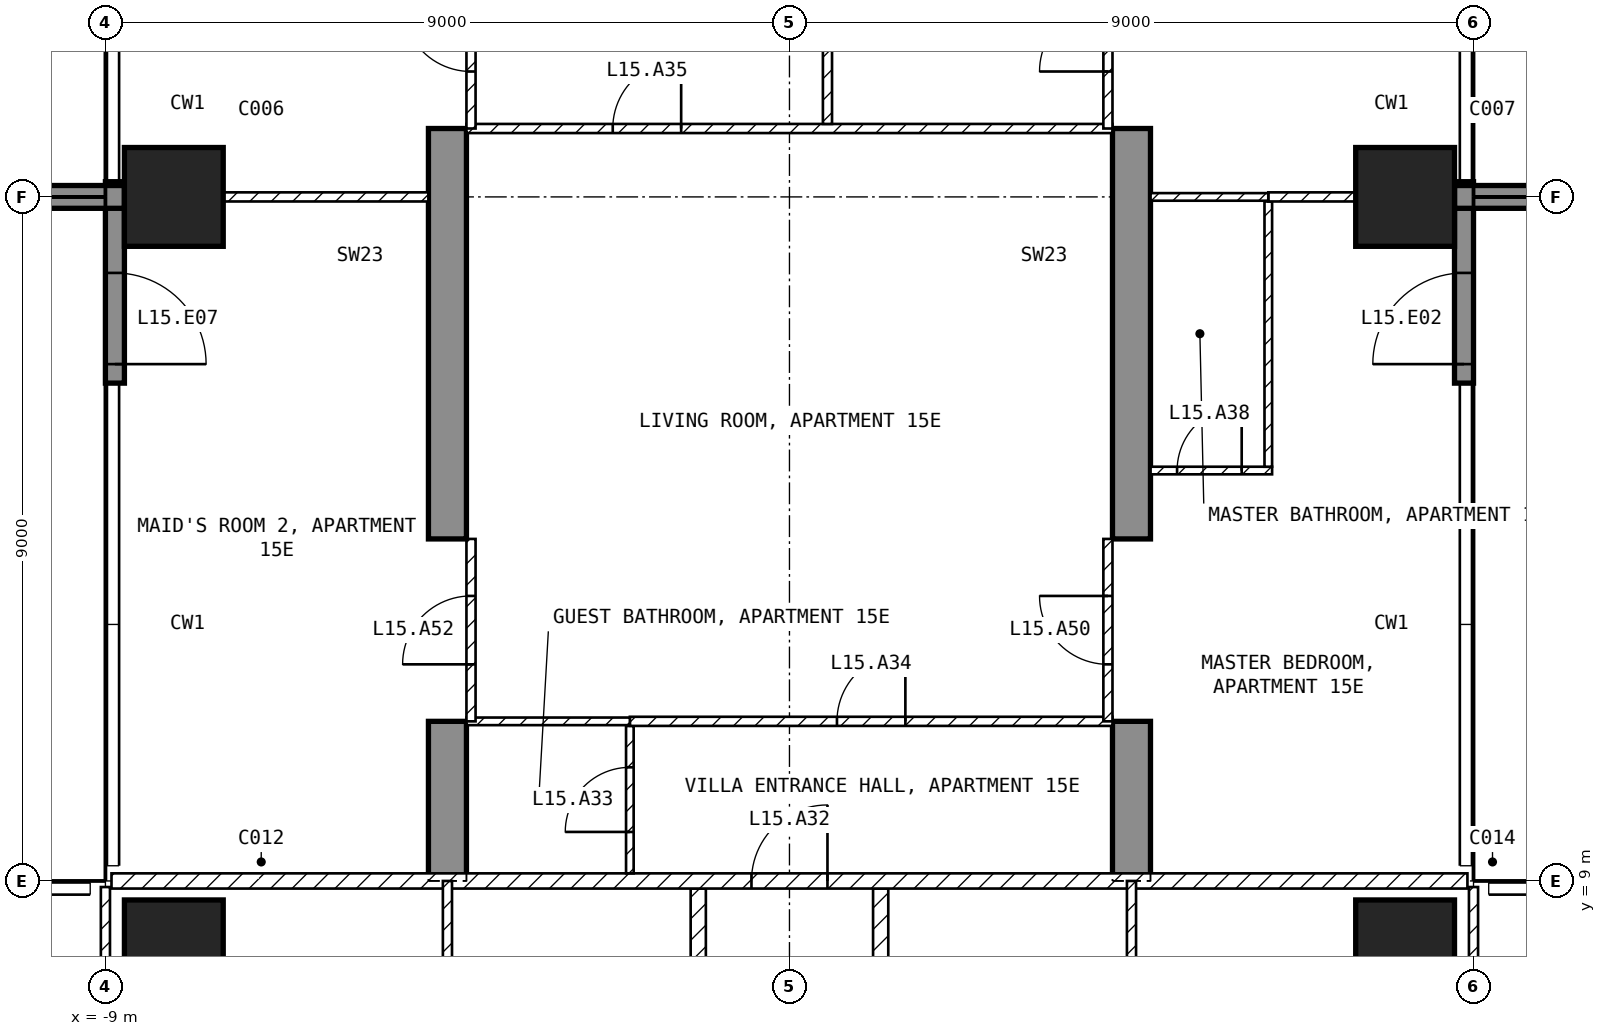
"""IFC4 building model, lengths in metres.
Left out: names, types, materials, properties, quantities, classifications, styles, units other than length and angle.
Written with IfcOpenShell. Run it as: python <this file> out.ifc"""

import sys

from ifc_helpers import new_model, si_unit, direction, frame, frame_2d, origin, origin_2d, place, context, subcontext, project, spatial, polyline, rectangle, outline, extrude, element, fill, save


model = new_model("IFC4")
c1 = context("Model", 3, precision=1e-05, world=origin(), true_north=direction((0.0, 1.0)))
c2 = subcontext(c1, "Body", "Model", "MODEL_VIEW")
j1 = project(units=[si_unit("LENGTHUNIT", "METRE"), si_unit("PLANEANGLEUNIT", "RADIAN")], contexts=[c1])
p1 = place(None, origin())
s1 = spatial("IfcSite", under=j1, at=p1, CompositionType="ELEMENT")
p2 = place(p1, origin())
s2 = spatial("IfcBuilding", under=s1, at=p2, CompositionType="ELEMENT")
p3 = place(p2, frame((0.0, 0.0, 71.5)))
s3 = spatial("IfcBuildingStorey", under=s2, at=p3, CompositionType="ELEMENT", Elevation=71.5)
for number, where, z_axis, x_axis in (
    (1, (-8.1, 8.1, -0.25), (0.0, 0.0, 1.0), (1.0, 0.0, 0.0)),
    (2, (-8.1, 18.0, -0.25), (0.0, 0.0, 1.0), (1.0, 0.0, 0.0)),
    (3, (8.1, 8.1, -0.25), (0.0, 0.0, 1.0), (1.0, 0.0, 0.0)),
    (4, (8.1, 18.0, -0.25), (0.0, 0.0, 1.0), (1.0, 0.0, 0.0)),
):
    element("IfcColumn", number, at=place(p3, frame(where, z_axis=z_axis, x_axis=x_axis)), inside=s3, PredefinedType="COLUMN", context=c2, shape_type="SweptSolid", body=[
        extrude(rectangle(XDim=1.3, YDim=1.3, at=origin_2d()), origin(), (0.0, 0.0, 1.0), 3.5),
    ])
for number, where, z_axis, x_axis in (
    (5, (-4.75, 9.0, -0.25), (1.0, 0.0, 0.0), (0.0, 1.0, 0.0)),
    (6, (4.25, 9.0, -0.25), (1.0, 0.0, 0.0), (0.0, 1.0, 0.0)),
):
    element("IfcWall", number, at=place(p3, frame(where, z_axis=z_axis, x_axis=x_axis)), inside=s3, PredefinedType="SHEAR", context=c2, shape_type="SweptSolid", body=[
        extrude(outline(polyline([(0.0, 0.0), (2.1, 0.0), (2.1, 2.65), (4.5, 2.65), (4.5, 0.0), (9.9, 0.0), (9.9, 2.65), (12.3, 2.65), (12.3, 0.0), (16.45, 0.0), (16.45, 3.5), (0.0, 3.5), (0.0, 0.0)])), origin(), (0.0, 0.0, 1.0), 0.5),
    ])
p4 = place(p3, frame((8.875, 15.55, 0.0), z_axis=(0.0, 0.0, 1.0), x_axis=(0.0, 1.0, 0.0)))
e7 = element("IfcWall", 7, at=p4, inside=s3, PredefinedType="SOLIDWALL", context=c2, shape_type="SweptSolid", body=[
    extrude(rectangle(XDim=2.65, YDim=0.25, at=frame_2d((1.325, 0.0))), origin(), (0.0, 0.0, 1.0), 3.25),
])
p5 = place(p4, frame((0.25, 0.0, 0.0)))
e8 = element("IfcOpeningElement", 8, at=p5, cuts=e7, PredefinedType="OPENING", context=c2, shape_type="SweptSolid", body=[
    extrude(rectangle(XDim=1.2, YDim=2.4, at=frame_2d((0.6, 1.2))), frame((0.0, 0.135, 0.0), z_axis=(0.0, -1.0, 0.0), x_axis=(1.0, 0.0, 0.0)), (0.0, 0.0, 1.0), 0.27),
])
p6 = place(p3, frame((-8.875, 18.2, 0.0), z_axis=(0.0, 0.0, 1.0), x_axis=(0.0, -1.0, 0.0)))
e9 = element("IfcWall", 9, at=p6, inside=s3, PredefinedType="SOLIDWALL", context=c2, shape_type="SweptSolid", body=[
    extrude(rectangle(XDim=2.65, YDim=0.25, at=frame_2d((1.325, 0.0))), origin(), (0.0, 0.0, 1.0), 3.25),
])
p7 = place(p6, frame((1.2, 0.0, 0.0)))
e10 = element("IfcOpeningElement", 10, at=p7, cuts=e9, PredefinedType="OPENING", context=c2, shape_type="SweptSolid", body=[
    extrude(rectangle(XDim=1.2, YDim=2.4, at=frame_2d((0.6, 1.2))), frame((0.0, 0.135, 0.0), z_axis=(0.0, -1.0, 0.0), x_axis=(1.0, 0.0, 0.0)), (0.0, 0.0, 1.0), 0.27),
])
for number, where, z_axis, x_axis in (
    (11, (-8.75, 18.0, 0.0), (0.0, 0.0, 1.0), (-1.0, 0.0, 0.0)),
    (12, (8.75, 18.0, 0.0), (0.0, 0.0, 1.0), (1.0, 0.0, 0.0)),
):
    element("IfcWall", number, at=place(p3, frame(where, z_axis=z_axis, x_axis=x_axis)), inside=s3, PredefinedType="SOLIDWALL", context=c2, shape_type="SweptSolid", body=[
        extrude(rectangle(XDim=2.95, YDim=0.3, at=frame_2d((1.475, 0.0))), origin(), (0.0, 0.0, 1.0), 3.25),
    ])
for number, where, z_axis, x_axis in (
    (13, (1.2, 8.9, 0.0), (0.0, 0.0, 1.0), (0.0, -1.0, 0.0)),
    (14, (-1.2, 1.3, 0.0), (0.0, 0.0, 1.0), (0.0, 1.0, 0.0)),
):
    element("IfcWall", number, at=place(p3, frame(where, z_axis=z_axis, x_axis=x_axis)), inside=s3, PredefinedType="PARTITIONING", context=c2, shape_type="SweptSolid", body=[
        extrude(rectangle(XDim=7.6, YDim=0.2, at=frame_2d((3.8, 0.0))), origin(), (0.0, 0.0, 1.0), 3.25),
    ])
p8 = place(p3, frame((-8.92, 9.0, 0.0), z_axis=(0.0, 0.0, 1.0), x_axis=(1.0, 0.0, 0.0)))
e15 = element("IfcWall", 15, at=p8, inside=s3, PredefinedType="PARTITIONING", context=c2, shape_type="SweptSolid", body=[
    extrude(rectangle(XDim=17.84, YDim=0.2, at=frame_2d((8.92, 0.0))), origin(), (0.0, 0.0, 1.0), 3.25),
])
p9 = place(p8, frame((8.42, 0.0, 0.0)))
e16 = element("IfcOpeningElement", 16, at=p9, cuts=e15, PredefinedType="OPENING", context=c2, shape_type="SweptSolid", body=[
    extrude(rectangle(XDim=1.0, YDim=2.1, at=frame_2d((0.5, 1.05))), frame((0.0, 0.11, 0.0), z_axis=(0.0, -1.0, 0.0), x_axis=(1.0, 0.0, 0.0)), (0.0, 0.0, 1.0), 0.22),
])
p10 = place(p3, frame((9.0, 3.6, 0.0), z_axis=(0.0, 0.0, 1.0), x_axis=(0.0, 1.0, 0.0)))
e17 = element("IfcWall", 17, at=p10, inside=s3, PredefinedType="PARTITIONING", context=c2, shape_type="SweptSolid", body=[
    extrude(rectangle(XDim=5.32, YDim=0.12, at=frame_2d((2.66, 0.0))), origin(), (0.0, 0.0, 1.0), 3.25),
])
p11 = place(p10, frame((1.75, 0.0, 0.0)))
e18 = element("IfcOpeningElement", 18, at=p11, cuts=e17, PredefinedType="OPENING", context=c2, shape_type="SweptSolid", body=[
    extrude(rectangle(XDim=0.9, YDim=2.1, at=frame_2d((0.45, 1.05))), frame((0.0, 0.07, 0.0), z_axis=(0.0, -1.0, 0.0), x_axis=(1.0, 0.0, 0.0)), (0.0, 0.0, 1.0), 0.14),
])
p12 = place(p3, frame((4.5, 4.32, 0.0), z_axis=(0.0, 0.0, 1.0), x_axis=(0.0, 1.0, 0.0)))
e19 = element("IfcWall", 19, at=p12, inside=s3, PredefinedType="PARTITIONING", context=c2, shape_type="SweptSolid", body=[
    extrude(rectangle(XDim=4.68, YDim=0.12, at=frame_2d((2.34, 0.0))), origin(), (0.0, 0.0, 1.0), 3.25),
])
p13 = place(p12, frame((1.89, 0.0, 0.0)))
e20 = element("IfcOpeningElement", 20, at=p13, cuts=e19, PredefinedType="OPENING", context=c2, shape_type="SweptSolid", body=[
    extrude(rectangle(XDim=0.9, YDim=2.1, at=frame_2d((0.45, 1.05))), frame((0.0, 0.07, 0.0), z_axis=(0.0, -1.0, 0.0), x_axis=(1.0, 0.0, 0.0)), (0.0, 0.0, 1.0), 0.14),
])
p14 = place(p3, frame((-9.0, 8.92, 0.0), z_axis=(0.0, 0.0, 1.0), x_axis=(0.0, -1.0, 0.0)))
e21 = element("IfcWall", 21, at=p14, inside=s3, PredefinedType="PARTITIONING", context=c2, shape_type="SweptSolid", body=[
    extrude(rectangle(XDim=4.36, YDim=0.12, at=frame_2d((2.18, 0.0))), origin(), (0.0, 0.0, 1.0), 3.25),
])
p15 = place(p14, frame((2.69, 0.0, 0.0)))
e22 = element("IfcOpeningElement", 22, at=p15, cuts=e21, PredefinedType="OPENING", context=c2, shape_type="SweptSolid", body=[
    extrude(rectangle(XDim=0.9, YDim=2.1, at=frame_2d((0.45, 1.05))), frame((0.0, 0.07, 0.0), z_axis=(0.0, -1.0, 0.0), x_axis=(1.0, 0.0, 0.0)), (0.0, 0.0, 1.0), 0.14),
])
p16 = place(p3, frame((-4.5, 9.0, 0.0), z_axis=(0.0, 0.0, 1.0), x_axis=(0.0, -1.0, 0.0)))
e23 = element("IfcWall", 23, at=p16, inside=s3, PredefinedType="PARTITIONING", context=c2, shape_type="SweptSolid", body=[
    extrude(rectangle(XDim=7.7, YDim=0.12, at=frame_2d((3.85, 0.0))), origin(), (0.0, 0.0, 1.0), 3.25),
])
p17 = place(p16, frame((1.812, 0.0, 0.0)))
e24 = element("IfcOpeningElement", 24, at=p17, cuts=e23, PredefinedType="OPENING", context=c2, shape_type="SweptSolid", body=[
    extrude(rectangle(XDim=0.9, YDim=2.1, at=frame_2d((0.45, 1.05))), frame((0.0, 0.07, 0.0), z_axis=(0.0, -1.0, 0.0), x_axis=(1.0, 0.0, 0.0)), (0.0, 0.0, 1.0), 0.14),
])
p18 = place(p3, frame((-2.1, 9.1, 0.0), z_axis=(0.0, 0.0, 1.0), x_axis=(0.0, 1.0, 0.0)))
e25 = element("IfcWall", 25, at=p18, inside=s3, PredefinedType="PARTITIONING", context=c2, shape_type="SweptSolid", body=[
    extrude(rectangle(XDim=1.94, YDim=0.1, at=frame_2d((0.97, 0.0))), origin(), (0.0, 0.0, 1.0), 3.25),
])
p19 = place(p18, frame((0.545, 0.0, 0.0)))
e26 = element("IfcOpeningElement", 26, at=p19, cuts=e25, PredefinedType="OPENING", context=c2, shape_type="SweptSolid", body=[
    extrude(rectangle(XDim=0.85, YDim=2.1, at=frame_2d((0.425, 1.05))), frame((0.0, 0.06, 0.0), z_axis=(0.0, -1.0, 0.0), x_axis=(1.0, 0.0, 0.0)), (0.0, 0.0, 1.0), 0.12),
])
p20 = place(p3, frame((-2.1, 11.1, 0.0), z_axis=(0.0, 0.0, 1.0), x_axis=(1.0, 0.0, 0.0)))
e27 = element("IfcWall", 27, at=p20, inside=s3, PredefinedType="PARTITIONING", context=c2, shape_type="SweptSolid", body=[
    extrude(rectangle(XDim=6.35, YDim=0.12, at=frame_2d((3.175, 0.0))), origin(), (0.0, 0.0, 1.0), 3.25),
])
p21 = place(p20, frame((2.725, 0.0, 0.0)))
e28 = element("IfcOpeningElement", 28, at=p21, cuts=e27, PredefinedType="OPENING", context=c2, shape_type="SweptSolid", body=[
    extrude(rectangle(XDim=0.9, YDim=2.1, at=frame_2d((0.45, 1.05))), frame((0.0, 0.07, 0.0), z_axis=(0.0, -1.0, 0.0), x_axis=(1.0, 0.0, 0.0)), (0.0, 0.0, 1.0), 0.14),
])
p22 = place(p3, frame((-4.25, 11.1, 0.0), z_axis=(0.0, 0.0, 1.0), x_axis=(1.0, 0.0, 0.0)))
e29 = element("IfcWall", 29, at=p22, inside=s3, PredefinedType="PARTITIONING", context=c2, shape_type="SweptSolid", body=[
    extrude(rectangle(XDim=2.15, YDim=0.1, at=frame_2d((1.075, 0.0))), origin(), (0.0, 0.0, 1.0), 3.25),
])
p23 = place(p3, frame((-4.25, 18.9, 0.0), z_axis=(0.0, 0.0, 1.0), x_axis=(1.0, 0.0, 0.0)))
e30 = element("IfcWall", 30, at=p23, inside=s3, PredefinedType="PARTITIONING", context=c2, shape_type="SweptSolid", body=[
    extrude(rectangle(XDim=8.5, YDim=0.12, at=frame_2d((4.25, 0.0))), origin(), (0.0, 0.0, 1.0), 3.25),
])
p24 = place(p23, frame((1.925, 0.0, 0.0)))
e31 = element("IfcOpeningElement", 31, at=p24, cuts=e30, PredefinedType="OPENING", context=c2, shape_type="SweptSolid", body=[
    extrude(rectangle(XDim=0.9, YDim=2.1, at=frame_2d((0.45, 1.05))), frame((0.0, 0.07, 0.0), z_axis=(0.0, -1.0, 0.0), x_axis=(1.0, 0.0, 0.0)), (0.0, 0.0, 1.0), 0.14),
])
p25 = place(p3, frame((0.5, 23.34, 0.0), z_axis=(0.0, 0.0, 1.0), x_axis=(0.0, -1.0, 0.0)))
e32 = element("IfcWall", 32, at=p25, inside=s3, PredefinedType="PARTITIONING", context=c2, shape_type="SweptSolid", body=[
    extrude(rectangle(XDim=4.38, YDim=0.12, at=frame_2d((2.19, 0.0))), origin(), (0.0, 0.0, 1.0), 3.25),
])
p26 = place(p25, frame((1.74, 0.0, 0.0)))
e33 = element("IfcOpeningElement", 33, at=p26, cuts=e32, PredefinedType="OPENING", context=c2, shape_type="SweptSolid", body=[
    extrude(rectangle(XDim=0.9, YDim=2.1, at=frame_2d((0.45, 1.05))), frame((0.0, 0.07, 0.0), z_axis=(0.0, -1.0, 0.0), x_axis=(1.0, 0.0, 0.0)), (0.0, 0.0, 1.0), 0.14),
])
p27 = place(p3, frame((4.75, 14.4, 0.0), z_axis=(0.0, 0.0, 1.0), x_axis=(1.0, 0.0, 0.0)))
e34 = element("IfcWall", 34, at=p27, inside=s3, PredefinedType="PARTITIONING", context=c2, shape_type="SweptSolid", body=[
    extrude(rectangle(XDim=1.6, YDim=0.1, at=frame_2d((0.8, 0.0))), origin(), (0.0, 0.0, 1.0), 3.25),
])
p28 = place(p27, frame((0.35, 0.0, 0.0)))
e35 = element("IfcOpeningElement", 35, at=p28, cuts=e34, PredefinedType="OPENING", context=c2, shape_type="SweptSolid", body=[
    extrude(rectangle(XDim=0.85, YDim=2.1, at=frame_2d((0.425, 1.05))), frame((0.0, 0.06, 0.0), z_axis=(0.0, -1.0, 0.0), x_axis=(1.0, 0.0, 0.0)), (0.0, 0.0, 1.0), 0.12),
])
p29 = place(p3, frame((6.3, 14.45, 0.0), z_axis=(0.0, 0.0, 1.0), x_axis=(0.0, 1.0, 0.0)))
e36 = element("IfcWall", 36, at=p29, inside=s3, PredefinedType="PARTITIONING", context=c2, shape_type="SweptSolid", body=[
    extrude(rectangle(XDim=3.49, YDim=0.1, at=frame_2d((1.745, 0.0))), origin(), (0.0, 0.0, 1.0), 3.25),
])
p30 = place(p3, frame((6.3, 18.0, 0.0), z_axis=(0.0, 0.0, 1.0), x_axis=(1.0, 0.0, 0.0)))
e37 = element("IfcWall", 37, at=p30, inside=s3, PredefinedType="PARTITIONING", context=c2, shape_type="SweptSolid", body=[
    extrude(rectangle(XDim=1.15, YDim=0.12, at=frame_2d((0.575, 0.0))), origin(), (0.0, 0.0, 1.0), 2.346),
])
p31 = place(p3, frame((4.75, 18.0, 0.0), z_axis=(0.0, 0.0, 1.0), x_axis=(1.0, 0.0, 0.0)))
e38 = element("IfcWall", 38, at=p31, inside=s3, PredefinedType="PARTITIONING", context=c2, shape_type="SweptSolid", body=[
    extrude(rectangle(XDim=1.55, YDim=0.1, at=frame_2d((0.775, 0.0))), origin(), (0.0, 0.0, 1.0), 2.346),
])
p32 = place(p3, frame((-7.45, 18.0, 0.0), z_axis=(0.0, 0.0, 1.0), x_axis=(1.0, 0.0, 0.0)))
e39 = element("IfcWall", 39, at=p32, inside=s3, PredefinedType="PARTITIONING", context=c2, shape_type="SweptSolid", body=[
    extrude(rectangle(XDim=2.7, YDim=0.12, at=frame_2d((1.35, 0.0))), origin(), (0.0, 0.0, 1.0), 2.346),
])
p33 = place(p3, frame((4.19, 11.1, 0.0), z_axis=(0.0, 0.0, 1.0), x_axis=(0.0, 1.0, 0.0)))
e40 = element("IfcWall", 40, at=p33, inside=s3, PredefinedType="PARTITIONING", context=c2, shape_type="SweptSolid", body=[
    extrude(rectangle(XDim=2.4, YDim=0.12, at=frame_2d((1.2, 0.0))), origin(), (0.0, 0.0, 1.0), 2.4),
])
p34 = place(p33, frame((0.75, 0.0, 0.0)))
e41 = element("IfcOpeningElement", 41, at=p34, cuts=e40, PredefinedType="OPENING", context=c2, shape_type="SweptSolid", body=[
    extrude(rectangle(XDim=0.9, YDim=2.1, at=frame_2d((0.45, 1.05))), frame((0.0, 0.07, 0.0), z_axis=(0.0, -1.0, 0.0), x_axis=(1.0, 0.0, 0.0)), (0.0, 0.0, 1.0), 0.14),
])
p35 = place(p3, frame((4.19, 18.9, 0.0), z_axis=(0.0, 0.0, 1.0), x_axis=(0.0, 1.0, 0.0)))
e42 = element("IfcWall", 42, at=p35, inside=s3, PredefinedType="PARTITIONING", context=c2, shape_type="SweptSolid", body=[
    extrude(rectangle(XDim=2.4, YDim=0.12, at=frame_2d((1.2, 0.0))), origin(), (0.0, 0.0, 1.0), 2.4),
])
p36 = place(p35, frame((0.75, 0.0, 0.0)))
e43 = element("IfcOpeningElement", 43, at=p36, cuts=e42, PredefinedType="OPENING", context=c2, shape_type="SweptSolid", body=[
    extrude(rectangle(XDim=0.9, YDim=2.1, at=frame_2d((0.45, 1.05))), frame((0.0, 0.07, 0.0), z_axis=(0.0, -1.0, 0.0), x_axis=(1.0, 0.0, 0.0)), (0.0, 0.0, 1.0), 0.14),
])
p37 = place(p3, frame((-4.19, 11.1, 0.0), z_axis=(0.0, 0.0, 1.0), x_axis=(0.0, 1.0, 0.0)))
e44 = element("IfcWall", 44, at=p37, inside=s3, PredefinedType="PARTITIONING", context=c2, shape_type="SweptSolid", body=[
    extrude(rectangle(XDim=2.4, YDim=0.12, at=frame_2d((1.2, 0.0))), origin(), (0.0, 0.0, 1.0), 2.4),
])
p38 = place(p37, frame((0.75, 0.0, 0.0)))
e45 = element("IfcOpeningElement", 45, at=p38, cuts=e44, PredefinedType="OPENING", context=c2, shape_type="SweptSolid", body=[
    extrude(rectangle(XDim=0.9, YDim=2.1, at=frame_2d((0.45, 1.05))), frame((0.0, 0.07, 0.0), z_axis=(0.0, -1.0, 0.0), x_axis=(1.0, 0.0, 0.0)), (0.0, 0.0, 1.0), 0.14),
])
p39 = place(p3, frame((-4.19, 18.9, 0.0), z_axis=(0.0, 0.0, 1.0), x_axis=(0.0, 1.0, 0.0)))
e46 = element("IfcWall", 46, at=p39, inside=s3, PredefinedType="PARTITIONING", context=c2, shape_type="SweptSolid", body=[
    extrude(rectangle(XDim=2.4, YDim=0.12, at=frame_2d((1.2, 0.0))), origin(), (0.0, 0.0, 1.0), 2.4),
])
p40 = place(p39, frame((0.75, 0.0, 0.0)))
e47 = element("IfcOpeningElement", 47, at=p40, cuts=e46, PredefinedType="OPENING", context=c2, shape_type="SweptSolid", body=[
    extrude(rectangle(XDim=0.9, YDim=2.1, at=frame_2d((0.45, 1.05))), frame((0.0, 0.07, 0.0), z_axis=(0.0, -1.0, 0.0), x_axis=(1.0, 0.0, 0.0)), (0.0, 0.0, 1.0), 0.14),
])
p41 = place(p5, origin())
e48 = element("IfcDoor", 48, at=p41, inside=s3, OperationType="SINGLE_SWING_LEFT", PredefinedType="DOOR", context=c2, shape_type="SweptSolid", body=[
    extrude(rectangle(XDim=1.2, YDim=2.4, at=frame_2d((0.6, 1.2))), frame((0.0, 0.025, 0.0), z_axis=(0.0, -1.0, 0.0), x_axis=(1.0, 0.0, 0.0)), (0.0, 0.0, 1.0), 0.05),
])
fill(e8, e48)
p42 = place(p7, origin())
e49 = element("IfcDoor", 49, at=p42, inside=s3, OperationType="SINGLE_SWING_RIGHT", PredefinedType="DOOR", context=c2, shape_type="SweptSolid", body=[
    extrude(rectangle(XDim=1.2, YDim=2.4, at=frame_2d((0.6, 1.2))), frame((0.0, 0.025, 0.0), z_axis=(0.0, -1.0, 0.0), x_axis=(1.0, 0.0, 0.0)), (0.0, 0.0, 1.0), 0.05),
])
fill(e10, e49)
p43 = place(p9, origin())
e50 = element("IfcDoor", 50, at=p43, inside=s3, OperationType="SINGLE_SWING_RIGHT", PredefinedType="DOOR", context=c2, shape_type="SweptSolid", body=[
    extrude(rectangle(XDim=1.0, YDim=2.1, at=frame_2d((0.5, 1.05))), frame((0.0, 0.025, 0.0), z_axis=(0.0, -1.0, 0.0), x_axis=(1.0, 0.0, 0.0)), (0.0, 0.0, 1.0), 0.05),
])
fill(e16, e50)
p44 = place(p19, origin())
e51 = element("IfcDoor", 51, at=p44, inside=s3, OperationType="SINGLE_SWING_LEFT", PredefinedType="DOOR", context=c2, shape_type="SweptSolid", body=[
    extrude(rectangle(XDim=0.85, YDim=2.1, at=frame_2d((0.425, 1.05))), frame((0.0, 0.025, 0.0), z_axis=(0.0, -1.0, 0.0), x_axis=(1.0, 0.0, 0.0)), (0.0, 0.0, 1.0), 0.05),
])
fill(e26, e51)
p45 = place(p21, origin())
e52 = element("IfcDoor", 52, at=p45, inside=s3, OperationType="SINGLE_SWING_RIGHT", PredefinedType="DOOR", context=c2, shape_type="SweptSolid", body=[
    extrude(rectangle(XDim=0.9, YDim=2.1, at=frame_2d((0.45, 1.05))), frame((0.0, 0.025, 0.0), z_axis=(0.0, -1.0, 0.0), x_axis=(1.0, 0.0, 0.0)), (0.0, 0.0, 1.0), 0.05),
])
fill(e28, e52)
p46 = place(p24, origin())
e53 = element("IfcDoor", 53, at=p46, inside=s3, OperationType="SINGLE_SWING_RIGHT", PredefinedType="DOOR", context=c2, shape_type="SweptSolid", body=[
    extrude(rectangle(XDim=0.9, YDim=2.1, at=frame_2d((0.45, 1.05))), frame((0.0, 0.025, 0.0), z_axis=(0.0, -1.0, 0.0), x_axis=(1.0, 0.0, 0.0)), (0.0, 0.0, 1.0), 0.05),
])
fill(e31, e53)
p47 = place(p28, origin())
e54 = element("IfcDoor", 54, at=p47, inside=s3, OperationType="SINGLE_SWING_RIGHT", PredefinedType="DOOR", context=c2, shape_type="SweptSolid", body=[
    extrude(rectangle(XDim=0.85, YDim=2.1, at=frame_2d((0.425, 1.05))), frame((0.0, 0.025, 0.0), z_axis=(0.0, -1.0, 0.0), x_axis=(1.0, 0.0, 0.0)), (0.0, 0.0, 1.0), 0.05),
])
fill(e35, e54)
p48 = place(p34, origin())
e55 = element("IfcDoor", 55, at=p48, inside=s3, OperationType="SINGLE_SWING_RIGHT", PredefinedType="DOOR", context=c2, shape_type="SweptSolid", body=[
    extrude(rectangle(XDim=0.9, YDim=2.1, at=frame_2d((0.45, 1.05))), frame((0.0, 0.025, 0.0), z_axis=(0.0, -1.0, 0.0), x_axis=(1.0, 0.0, 0.0)), (0.0, 0.0, 1.0), 0.05),
])
fill(e41, e55)
p49 = place(p36, origin())
e56 = element("IfcDoor", 56, at=p49, inside=s3, OperationType="SINGLE_SWING_LEFT", PredefinedType="DOOR", context=c2, shape_type="SweptSolid", body=[
    extrude(rectangle(XDim=0.9, YDim=2.1, at=frame_2d((0.45, 1.05))), frame((0.0, 0.025, 0.0), z_axis=(0.0, -1.0, 0.0), x_axis=(1.0, 0.0, 0.0)), (0.0, 0.0, 1.0), 0.05),
])
fill(e43, e56)
p50 = place(p38, origin())
e57 = element("IfcDoor", 57, at=p50, inside=s3, OperationType="SINGLE_SWING_LEFT", PredefinedType="DOOR", context=c2, shape_type="SweptSolid", body=[
    extrude(rectangle(XDim=0.9, YDim=2.1, at=frame_2d((0.45, 1.05))), frame((0.0, 0.025, 0.0), z_axis=(0.0, -1.0, 0.0), x_axis=(1.0, 0.0, 0.0)), (0.0, 0.0, 1.0), 0.05),
])
fill(e45, e57)
p51 = place(p40, origin())
e58 = element("IfcDoor", 58, at=p51, inside=s3, OperationType="SINGLE_SWING_RIGHT", PredefinedType="DOOR", context=c2, shape_type="SweptSolid", body=[
    extrude(rectangle(XDim=0.9, YDim=2.1, at=frame_2d((0.45, 1.05))), frame((0.0, 0.025, 0.0), z_axis=(0.0, -1.0, 0.0), x_axis=(1.0, 0.0, 0.0)), (0.0, 0.0, 1.0), 0.05),
])
fill(e47, e58)
save(model, sys.argv[1])
